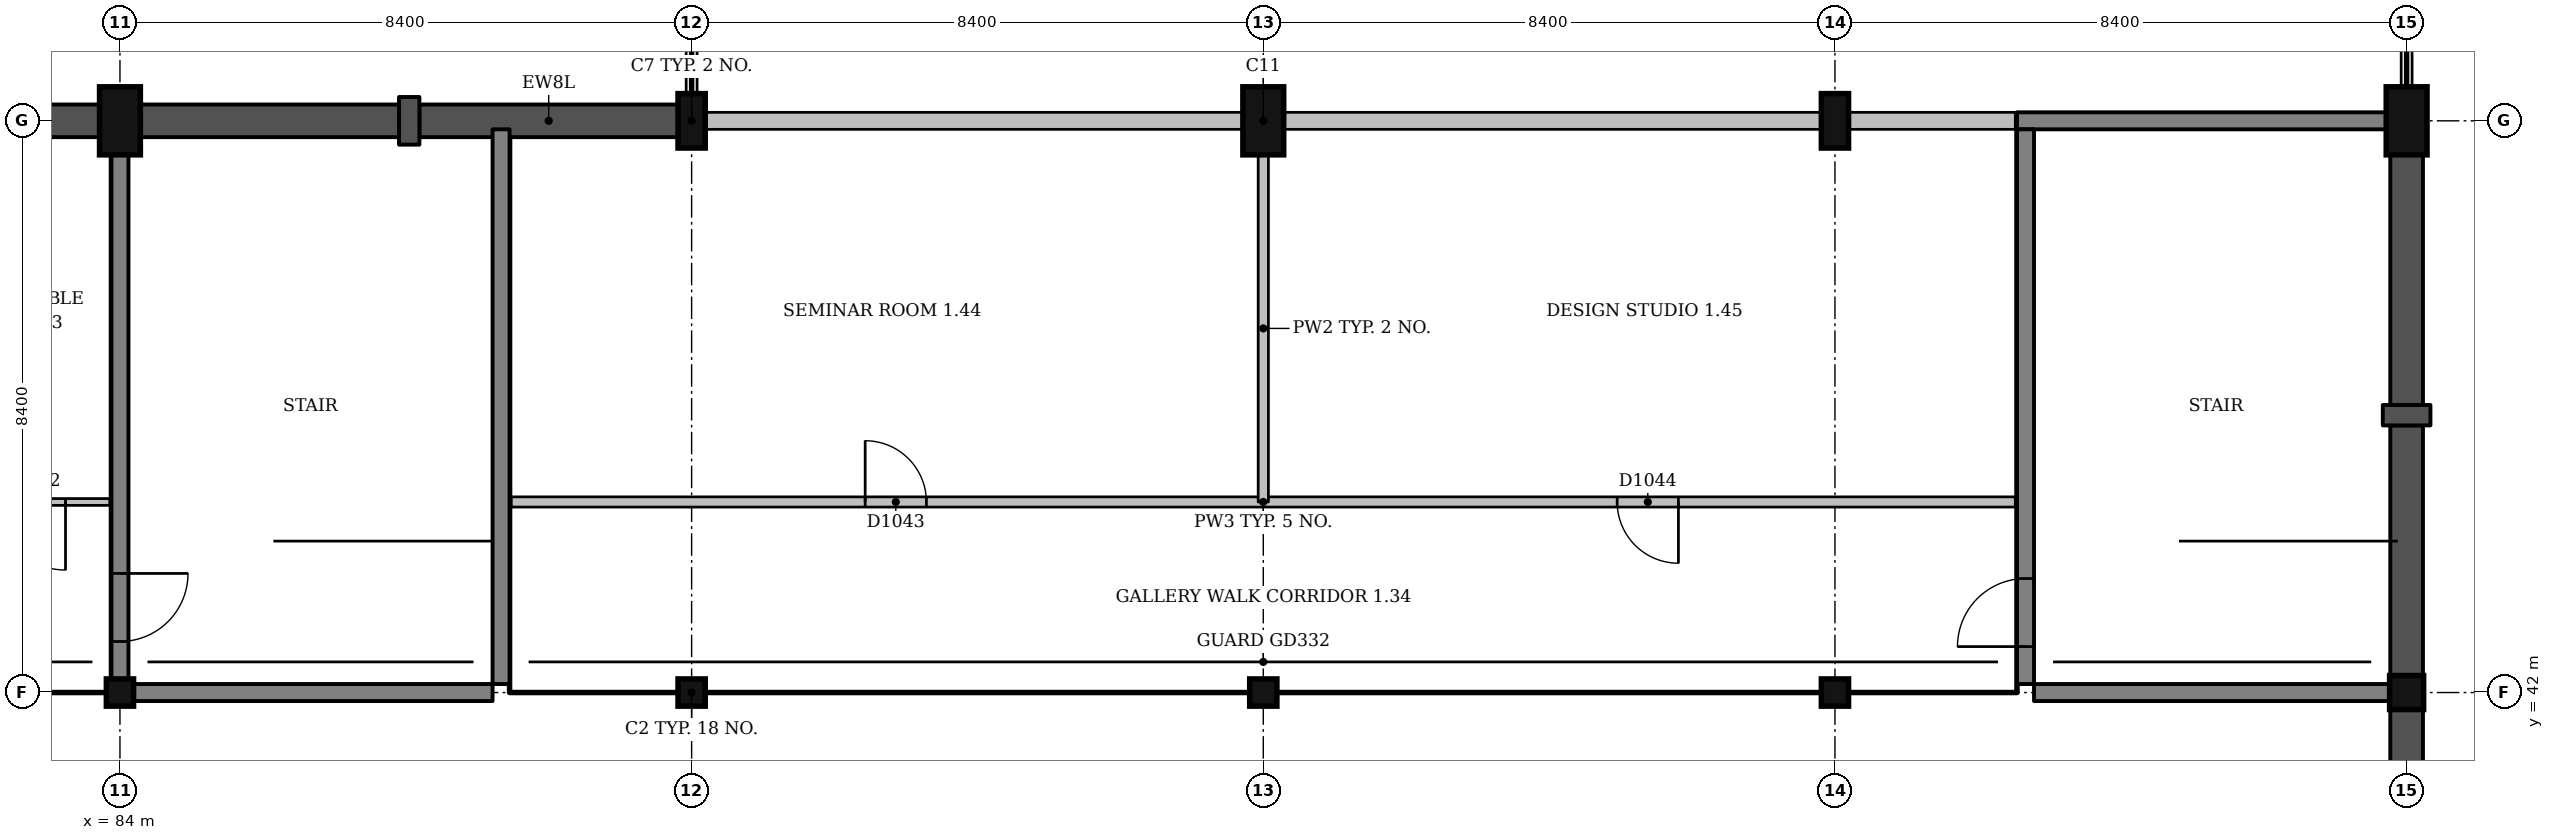
"""IFC4 building model, lengths in metres.
Left out: names, types, materials, properties, quantities, classifications, styles, units other than length and angle.
Written with IfcOpenShell. Run it as: python <this file> out.ifc"""

import sys

from ifc_helpers import new_model, si_unit, direction, frame, frame_2d, origin, origin_2d, place, context, subcontext, project, spatial, rectangle, extrude, element, fill, save


model = new_model("IFC4")
c1 = context("Model", 3, precision=1e-05, world=origin(), true_north=direction((0.0, 1.0)))
c2 = subcontext(c1, "Body", "Model", "MODEL_VIEW")
j1 = project(units=[si_unit("LENGTHUNIT", "METRE"), si_unit("PLANEANGLEUNIT", "RADIAN")], contexts=[c1])
p1 = place(None, origin())
s1 = spatial("IfcSite", under=j1, at=p1, CompositionType="ELEMENT")
p2 = place(p1, origin())
s2 = spatial("IfcBuilding", under=s1, at=p2, CompositionType="ELEMENT")
p3 = place(p2, frame((0.0, 0.0, 4.5)))
s3 = spatial("IfcBuildingStorey", under=s2, at=p3, CompositionType="ELEMENT", Elevation=4.5)
p4 = place(p3, frame((84.0, 42.0, 0.0), z_axis=(0.0, 0.0, 1.0), x_axis=(1.0, 0.0, 0.0)))
e1 = element("IfcColumn", 1, at=p4, inside=s3, PredefinedType="COLUMN", context=c2, shape_type="SweptSolid", body=[
    extrude(rectangle(XDim=0.4, YDim=0.4, at=origin_2d()), origin(), (0.0, 0.0, 1.0), 4.5),
])
p5 = place(p3, frame((84.0, 50.4, 0.0), z_axis=(0.0, 0.0, 1.0), x_axis=(1.0, 0.0, 0.0)))
e2 = element("IfcColumn", 2, at=p5, inside=s3, PredefinedType="COLUMN", context=c2, shape_type="SweptSolid", body=[
    extrude(rectangle(XDim=0.6, YDim=1.0, at=origin_2d()), origin(), (0.0, 0.0, 1.0), 4.5),
])
p6 = place(p3, frame((92.4, 42.0, 0.0), z_axis=(0.0, 0.0, 1.0), x_axis=(1.0, 0.0, 0.0)))
e3 = element("IfcColumn", 3, at=p6, inside=s3, PredefinedType="COLUMN", context=c2, shape_type="SweptSolid", body=[
    extrude(rectangle(XDim=0.4, YDim=0.4, at=origin_2d()), origin(), (0.0, 0.0, 1.0), 4.5),
])
p7 = place(p3, frame((92.4, 50.4, 0.0), z_axis=(0.0, 0.0, 1.0), x_axis=(1.0, 0.0, 0.0)))
e4 = element("IfcColumn", 4, at=p7, inside=s3, PredefinedType="COLUMN", context=c2, shape_type="SweptSolid", body=[
    extrude(rectangle(XDim=0.4, YDim=0.8, at=origin_2d()), origin(), (0.0, 0.0, 1.0), 4.5),
])
p8 = place(p3, frame((100.8, 42.0, 0.0), z_axis=(0.0, 0.0, 1.0), x_axis=(1.0, 0.0, 0.0)))
e5 = element("IfcColumn", 5, at=p8, inside=s3, PredefinedType="COLUMN", context=c2, shape_type="SweptSolid", body=[
    extrude(rectangle(XDim=0.4, YDim=0.4, at=origin_2d()), origin(), (0.0, 0.0, 1.0), 4.5),
])
p9 = place(p3, frame((100.8, 50.4, 0.0), z_axis=(0.0, 0.0, 1.0), x_axis=(1.0, 0.0, 0.0)))
e6 = element("IfcColumn", 6, at=p9, inside=s3, PredefinedType="COLUMN", context=c2, shape_type="SweptSolid", body=[
    extrude(rectangle(XDim=0.6, YDim=1.0, at=origin_2d()), origin(), (0.0, 0.0, 1.0), 4.5),
])
p10 = place(p3, frame((109.2, 42.0, 0.0), z_axis=(0.0, 0.0, 1.0), x_axis=(1.0, 0.0, 0.0)))
e7 = element("IfcColumn", 7, at=p10, inside=s3, PredefinedType="COLUMN", context=c2, shape_type="SweptSolid", body=[
    extrude(rectangle(XDim=0.4, YDim=0.4, at=origin_2d()), origin(), (0.0, 0.0, 1.0), 4.5),
])
p11 = place(p3, frame((109.2, 50.4, 0.0), z_axis=(0.0, 0.0, 1.0), x_axis=(1.0, 0.0, 0.0)))
e8 = element("IfcColumn", 8, at=p11, inside=s3, PredefinedType="COLUMN", context=c2, shape_type="SweptSolid", body=[
    extrude(rectangle(XDim=0.4, YDim=0.8, at=origin_2d()), origin(), (0.0, 0.0, 1.0), 4.5),
])
p12 = place(p3, frame((117.6, 42.0, 0.0), z_axis=(0.0, 0.0, 1.0), x_axis=(1.0, 0.0, 0.0)))
e9 = element("IfcColumn", 9, at=p12, inside=s3, PredefinedType="COLUMN", context=c2, shape_type="SweptSolid", body=[
    extrude(rectangle(XDim=0.5, YDim=0.5, at=origin_2d()), origin(), (0.0, 0.0, 1.0), 4.5),
])
p13 = place(p3, frame((117.6, 50.4, 0.0), z_axis=(0.0, 0.0, 1.0), x_axis=(1.0, 0.0, 0.0)))
e10 = element("IfcColumn", 10, at=p13, inside=s3, PredefinedType="COLUMN", context=c2, shape_type="SweptSolid", body=[
    extrude(rectangle(XDim=0.6, YDim=1.0, at=origin_2d()), origin(), (0.0, 0.0, 1.0), 4.5),
])
p14 = place(p3, frame((84.0, 42.2, 0.0), z_axis=(0.0, 0.0, 1.0), x_axis=(0.0, 1.0, 0.0)))
e11 = element("IfcWall", 11, at=p14, inside=s3, PredefinedType="SHEAR", context=c2, shape_type="SweptSolid", body=[
    extrude(rectangle(XDim=7.7, YDim=0.25, at=frame_2d((3.85, 0.0))), origin(), (0.0, 0.0, 1.0), 4.5),
])
p15 = place(p14, frame((0.55, 0.0, 0.0)))
e12 = element("IfcOpeningElement", 12, at=p15, cuts=e11, PredefinedType="OPENING", context=c2, shape_type="SweptSolid", body=[
    extrude(rectangle(XDim=1.0, YDim=2.1, at=frame_2d((0.5, 1.05))), frame((0.0, 0.135, 0.0), z_axis=(0.0, -1.0, 0.0), x_axis=(1.0, 0.0, 0.0)), (0.0, 0.0, 1.0), 0.27),
])
p16 = place(p3, frame((89.6, 42.125, 0.0), z_axis=(0.0, 0.0, 1.0), x_axis=(0.0, 1.0, 0.0)))
e13 = element("IfcWall", 13, at=p16, inside=s3, PredefinedType="SHEAR", context=c2, shape_type="SweptSolid", body=[
    extrude(rectangle(XDim=8.15, YDim=0.25, at=frame_2d((4.075, 0.0))), origin(), (0.0, 0.0, 1.0), 4.5),
])
p17 = place(p3, frame((111.875, 50.4, 0.0), z_axis=(0.0, 0.0, 1.0), x_axis=(1.0, 0.0, 0.0)))
e14 = element("IfcWall", 14, at=p17, inside=s3, PredefinedType="SHEAR", context=c2, shape_type="SweptSolid", body=[
    extrude(rectangle(XDim=5.425, YDim=0.25, at=frame_2d((2.712, 0.0))), origin(), (0.0, 0.0, 1.0), 4.5),
])
p18 = place(p3, frame((112.0, 42.125, 0.0), z_axis=(0.0, 0.0, 1.0), x_axis=(0.0, 1.0, 0.0)))
e15 = element("IfcWall", 15, at=p18, inside=s3, PredefinedType="SHEAR", context=c2, shape_type="SweptSolid", body=[
    extrude(rectangle(XDim=8.15, YDim=0.25, at=frame_2d((4.075, 0.0))), origin(), (0.0, 0.0, 1.0), 4.5),
])
p19 = place(p18, frame((0.55, 0.0, 0.0)))
e16 = element("IfcOpeningElement", 16, at=p19, cuts=e15, PredefinedType="OPENING", context=c2, shape_type="SweptSolid", body=[
    extrude(rectangle(XDim=1.0, YDim=2.1, at=frame_2d((0.5, 1.05))), frame((0.0, 0.135, 0.0), z_axis=(0.0, -1.0, 0.0), x_axis=(1.0, 0.0, 0.0)), (0.0, 0.0, 1.0), 0.27),
])
p20 = place(p3, frame((117.6, 42.25, 0.0), z_axis=(0.0, 0.0, 1.0), x_axis=(0.0, 1.0, 0.0)))
e17 = element("IfcWall", 17, at=p20, inside=s3, PredefinedType="SOLIDWALL", context=c2, shape_type="SweptSolid", body=[
    extrude(rectangle(XDim=3.675, YDim=0.48, at=frame_2d((1.837, 0.0))), origin(), (0.0, 0.0, 1.0), 2.489),
])
p21 = place(p3, frame((117.6, 45.925, 0.0), z_axis=(0.0, 0.0, 1.0), x_axis=(0.0, 1.0, 0.0)))
e18 = element("IfcWall", 18, at=p21, inside=s3, PredefinedType="SOLIDWALL", context=c2, shape_type="SweptSolid", body=[
    extrude(rectangle(XDim=0.3, YDim=0.7, at=frame_2d((0.15, 0.0))), origin(), (0.0, 0.0, 1.0), 2.489),
])
p22 = place(p3, frame((117.6, 46.225, 0.0), z_axis=(0.0, 0.0, 1.0), x_axis=(0.0, 1.0, 0.0)))
e19 = element("IfcWall", 19, at=p22, inside=s3, PredefinedType="SOLIDWALL", context=c2, shape_type="SweptSolid", body=[
    extrude(rectangle(XDim=3.675, YDim=0.48, at=frame_2d((1.837, 0.0))), origin(), (0.0, 0.0, 1.0), 2.489),
])
p23 = place(p3, frame((92.2, 50.4, 0.0), z_axis=(0.0, 0.0, 1.0), x_axis=(-1.0, 0.0, 0.0)))
e20 = element("IfcWall", 20, at=p23, inside=s3, PredefinedType="SOLIDWALL", context=c2, shape_type="SweptSolid", body=[
    extrude(rectangle(XDim=3.8, YDim=0.48, at=frame_2d((1.9, 0.0))), origin(), (0.0, 0.0, 1.0), 3.75),
])
p24 = place(p3, frame((88.4, 50.4, 0.0), z_axis=(0.0, 0.0, 1.0), x_axis=(-1.0, 0.0, 0.0)))
e21 = element("IfcWall", 21, at=p24, inside=s3, PredefinedType="SOLIDWALL", context=c2, shape_type="SweptSolid", body=[
    extrude(rectangle(XDim=0.3, YDim=0.7, at=frame_2d((0.15, 0.0))), origin(), (0.0, 0.0, 1.0), 3.75),
])
p25 = place(p3, frame((88.1, 50.4, 0.0), z_axis=(0.0, 0.0, 1.0), x_axis=(-1.0, 0.0, 0.0)))
e22 = element("IfcWall", 22, at=p25, inside=s3, PredefinedType="SOLIDWALL", context=c2, shape_type="SweptSolid", body=[
    extrude(rectangle(XDim=3.8, YDim=0.48, at=frame_2d((1.9, 0.0))), origin(), (0.0, 0.0, 1.0), 3.75),
])
p26 = place(p3, frame((83.7, 50.4, 0.0), z_axis=(0.0, 0.0, 1.0), x_axis=(-1.0, 0.0, 0.0)))
e23 = element("IfcWall", 23, at=p26, inside=s3, PredefinedType="SOLIDWALL", context=c2, shape_type="SweptSolid", body=[
    extrude(rectangle(XDim=2.15, YDim=0.48, at=frame_2d((1.075, 0.0))), origin(), (0.0, 0.0, 1.0), 3.75),
])
p27 = place(p26, frame((0.775, 0.0, 1.5)))
e24 = element("IfcOpeningElement", 24, at=p27, cuts=e23, PredefinedType="OPENING", context=c2, shape_type="SweptSolid", body=[
    extrude(rectangle(XDim=0.6, YDim=1.2, at=frame_2d((0.3, 0.6))), frame((0.0, 0.25, 0.0), z_axis=(0.0, -1.0, 0.0), x_axis=(1.0, 0.0, 0.0)), (0.0, 0.0, 1.0), 0.5),
])
p28 = place(p3, frame((117.6, 37.95, 0.0), z_axis=(0.0, 0.0, 1.0), x_axis=(0.0, 1.0, 0.0)))
e25 = element("IfcWall", 25, at=p28, inside=s3, PredefinedType="SOLIDWALL", context=c2, shape_type="SweptSolid", body=[
    extrude(rectangle(XDim=3.8, YDim=0.48, at=frame_2d((1.9, 0.0))), origin(), (0.0, 0.0, 1.0), 3.75),
])
p29 = place(p3, frame((89.75, 44.8, 0.0), z_axis=(0.0, 0.0, 1.0), x_axis=(1.0, 0.0, 0.0)))
e26 = element("IfcWall", 26, at=p29, inside=s3, PredefinedType="PARTITIONING", context=c2, shape_type="SweptSolid", body=[
    extrude(rectangle(XDim=22.1, YDim=0.15, at=frame_2d((11.05, 0.0))), origin(), (0.0, 0.0, 1.0), 4.15),
])
p30 = place(p29, frame((5.2, 0.0, 0.0)))
e27 = element("IfcOpeningElement", 27, at=p30, cuts=e26, PredefinedType="OPENING", context=c2, shape_type="SweptSolid", body=[
    extrude(rectangle(XDim=0.9, YDim=2.1, at=frame_2d((0.45, 1.05))), frame((0.0, 0.085, 0.0), z_axis=(0.0, -1.0, 0.0), x_axis=(1.0, 0.0, 0.0)), (0.0, 0.0, 1.0), 0.17),
])
p31 = place(p29, frame((16.25, 0.0, 0.0)))
e28 = element("IfcOpeningElement", 28, at=p31, cuts=e26, PredefinedType="OPENING", context=c2, shape_type="SweptSolid", body=[
    extrude(rectangle(XDim=0.9, YDim=2.1, at=frame_2d((0.45, 1.05))), frame((0.0, 0.085, 0.0), z_axis=(0.0, -1.0, 0.0), x_axis=(1.0, 0.0, 0.0)), (0.0, 0.0, 1.0), 0.17),
])
p32 = place(p3, frame((75.6, 44.8, 0.0), z_axis=(0.0, 0.0, 1.0), x_axis=(1.0, 0.0, 0.0)))
e29 = element("IfcWall", 29, at=p32, inside=s3, PredefinedType="PARTITIONING", context=c2, shape_type="SweptSolid", body=[
    extrude(rectangle(XDim=8.25, YDim=0.1, at=frame_2d((4.125, 0.0))), origin(), (0.0, 0.0, 1.0), 4.15),
])
p33 = place(p32, frame((1.0, 0.0, 0.0)))
e30 = element("IfcOpeningElement", 30, at=p33, cuts=e29, PredefinedType="OPENING", context=c2, shape_type="SweptSolid", body=[
    extrude(rectangle(XDim=0.9, YDim=2.1, at=frame_2d((0.45, 1.05))), frame((0.0, 0.06, 0.0), z_axis=(0.0, -1.0, 0.0), x_axis=(1.0, 0.0, 0.0)), (0.0, 0.0, 1.0), 0.12),
])
p34 = place(p32, frame((3.8, 0.0, 0.0)))
e31 = element("IfcOpeningElement", 31, at=p34, cuts=e29, PredefinedType="OPENING", context=c2, shape_type="SweptSolid", body=[
    extrude(rectangle(XDim=0.9, YDim=2.1, at=frame_2d((0.45, 1.05))), frame((0.0, 0.06, 0.0), z_axis=(0.0, -1.0, 0.0), x_axis=(1.0, 0.0, 0.0)), (0.0, 0.0, 1.0), 0.12),
])
p35 = place(p32, frame((6.6, 0.0, 0.0)))
e32 = element("IfcOpeningElement", 32, at=p35, cuts=e29, PredefinedType="OPENING", context=c2, shape_type="SweptSolid", body=[
    extrude(rectangle(XDim=1.0, YDim=2.1, at=frame_2d((0.5, 1.05))), frame((0.0, 0.06, 0.0), z_axis=(0.0, -1.0, 0.0), x_axis=(1.0, 0.0, 0.0)), (0.0, 0.0, 1.0), 0.12),
])
for number, where, z_axis, x_axis in (
    (33, (92.6, 50.4, 0.0), (0.0, 0.0, 1.0), (1.0, 0.0, 0.0)),
    (34, (101.1, 50.4, 0.0), (0.0, 0.0, 1.0), (1.0, 0.0, 0.0)),
):
    element("IfcWall", number, at=place(p3, frame(where, z_axis=z_axis, x_axis=x_axis)), inside=s3, PredefinedType="SOLIDWALL", context=c2, shape_type="SweptSolid", body=[
        extrude(rectangle(XDim=7.9, YDim=0.25, at=frame_2d((3.95, 0.0))), origin(), (0.0, 0.0, 1.0), 3.75),
    ])
p36 = place(p3, frame((109.4, 50.4, 0.0), z_axis=(0.0, 0.0, 1.0), x_axis=(1.0, 0.0, 0.0)))
e35 = element("IfcWall", 35, at=p36, inside=s3, PredefinedType="SOLIDWALL", context=c2, shape_type="SweptSolid", body=[
    extrude(rectangle(XDim=2.45, YDim=0.25, at=frame_2d((1.225, 0.0))), origin(), (0.0, 0.0, 1.0), 3.75),
])
p37 = place(p3, frame((100.8, 44.8, 0.0), z_axis=(0.0, 0.0, 1.0), x_axis=(0.0, 1.0, 0.0)))
e36 = element("IfcWall", 36, at=p37, inside=s3, PredefinedType="PARTITIONING", context=c2, shape_type="SweptSolid", body=[
    extrude(rectangle(XDim=5.1, YDim=0.15, at=frame_2d((2.55, 0.0))), origin(), (0.0, 0.0, 1.0), 2.489),
])
p38 = place(p3, frame((84.2, 42.0, 0.0), z_axis=(0.0, 0.0, 1.0), x_axis=(1.0, 0.0, 0.0)))
e37 = element("IfcWall", 37, at=p38, inside=s3, PredefinedType="SHEAR", context=c2, shape_type="SweptSolid", body=[
    extrude(rectangle(XDim=5.275, YDim=0.25, at=frame_2d((2.638, 0.0))), origin(), (0.0, 0.0, 1.0), 4.5),
])
p39 = place(p3, frame((112.125, 42.0, 0.0), z_axis=(0.0, 0.0, 1.0), x_axis=(1.0, 0.0, 0.0)))
e38 = element("IfcWall", 38, at=p39, inside=s3, PredefinedType="SHEAR", context=c2, shape_type="SweptSolid", body=[
    extrude(rectangle(XDim=5.225, YDim=0.25, at=frame_2d((2.613, 0.0))), origin(), (0.0, 0.0, 1.0), 4.5),
])
p40 = place(p35, origin())
e39 = element("IfcDoor", 39, at=p40, inside=s3, OperationType="SINGLE_SWING_RIGHT", PredefinedType="DOOR", context=c2, shape_type="SweptSolid", body=[
    extrude(rectangle(XDim=1.0, YDim=2.1, at=frame_2d((0.5, 1.05))), frame((0.0, 0.025, 0.0), z_axis=(0.0, -1.0, 0.0), x_axis=(1.0, 0.0, 0.0)), (0.0, 0.0, 1.0), 0.05),
])
fill(e32, e39)
p41 = place(p30, origin())
e40 = element("IfcDoor", 40, at=p41, inside=s3, OperationType="SINGLE_SWING_LEFT", PredefinedType="DOOR", context=c2, shape_type="SweptSolid", body=[
    extrude(rectangle(XDim=0.9, YDim=2.1, at=frame_2d((0.45, 1.05))), frame((0.0, 0.025, 0.0), z_axis=(0.0, -1.0, 0.0), x_axis=(1.0, 0.0, 0.0)), (0.0, 0.0, 1.0), 0.05),
])
fill(e27, e40)
p42 = place(p31, origin())
e41 = element("IfcDoor", 41, at=p42, inside=s3, OperationType="SINGLE_SWING_RIGHT", PredefinedType="DOOR", context=c2, shape_type="SweptSolid", body=[
    extrude(rectangle(XDim=0.9, YDim=2.1, at=frame_2d((0.45, 1.05))), frame((0.0, 0.025, 0.0), z_axis=(0.0, -1.0, 0.0), x_axis=(1.0, 0.0, 0.0)), (0.0, 0.0, 1.0), 0.05),
])
fill(e28, e41)
p43 = place(p15, origin())
e42 = element("IfcDoor", 42, at=p43, inside=s3, OperationType="SINGLE_SWING_RIGHT", PredefinedType="DOOR", context=c2, shape_type="SweptSolid", body=[
    extrude(rectangle(XDim=1.0, YDim=2.1, at=frame_2d((0.5, 1.05))), frame((0.0, 0.025, 0.0), z_axis=(0.0, -1.0, 0.0), x_axis=(1.0, 0.0, 0.0)), (0.0, 0.0, 1.0), 0.05),
])
fill(e12, e42)
p44 = place(p19, origin())
e43 = element("IfcDoor", 43, at=p44, inside=s3, OperationType="SINGLE_SWING_LEFT", PredefinedType="DOOR", context=c2, shape_type="SweptSolid", body=[
    extrude(rectangle(XDim=1.0, YDim=2.1, at=frame_2d((0.5, 1.05))), frame((0.0, 0.025, 0.0), z_axis=(0.0, -1.0, 0.0), x_axis=(1.0, 0.0, 0.0)), (0.0, 0.0, 1.0), 0.05),
])
fill(e16, e43)
save(model, sys.argv[1])
